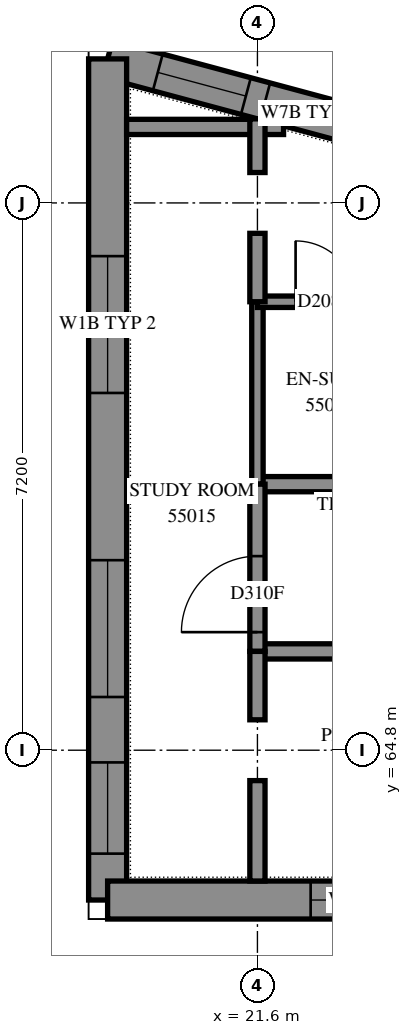
"""IFC4 building model, lengths in metres.
Left out: names, types, materials, properties, quantities, classifications, styles, units other than length and angle.
Written with IfcOpenShell. Run it as: python <this file> out.ifc"""

import sys

from ifc_helpers import new_model, si_unit, direction, frame, frame_2d, origin, place, context, subcontext, project, spatial, polyline, rectangle, outline, extrude, element, fill, save


model = new_model("IFC4")
c1 = context("Model", 3, precision=1e-05, world=origin(), true_north=direction((0.0, 1.0)))
c2 = subcontext(c1, "Body", "Model", "MODEL_VIEW")
j1 = project(units=[si_unit("LENGTHUNIT", "METRE"), si_unit("PLANEANGLEUNIT", "RADIAN")], contexts=[c1])
p1 = place(None, origin())
s1 = spatial("IfcSite", under=j1, at=p1, CompositionType="ELEMENT")
p2 = place(p1, origin())
s2 = spatial("IfcBuilding", under=s1, at=p2, CompositionType="ELEMENT")
p3 = place(p2, frame((0.0, 0.0, 203.2)))
s3 = spatial("IfcBuildingStorey", under=s2, at=p3, CompositionType="ELEMENT", Elevation=203.2)
p4 = place(p3, frame((23.156, 72.946, 0.0), z_axis=(0.0, 0.0, 1.0), x_axis=(-0.9656828727, 0.2597240638, 0.0)))
e1 = element("IfcWall", 1, at=p4, inside=s3, PredefinedType="SOLIDWALL", context=c2, shape_type="SweptSolid", body=[
    extrude(outline(polyline([(0.047, -0.25), (3.978, -0.25), (3.326, 0.25), (-0.047, 0.25), (0.047, -0.25)])), origin(), (0.0, 0.0, 1.0), 3.1),
])
p5 = place(p4, frame((0.306, 0.0, 0.7)))
e2 = element("IfcOpeningElement", 2, at=p5, cuts=e1, PredefinedType="OPENING", context=c2, shape_type="SweptSolid", body=[
    extrude(rectangle(XDim=1.2, YDim=2.1, at=frame_2d((0.6, 1.05))), frame((0.0, 0.26, 0.0), z_axis=(0.0, -1.0, 0.0), x_axis=(1.0, 0.0, 0.0)), (0.0, 0.0, 1.0), 0.52),
])
p6 = place(p4, frame((1.769, 0.0, 0.7)))
e3 = element("IfcOpeningElement", 3, at=p6, cuts=e1, PredefinedType="OPENING", context=c2, shape_type="SweptSolid", body=[
    extrude(rectangle(XDim=1.2, YDim=2.1, at=frame_2d((0.6, 1.05))), frame((0.0, 0.26, 0.0), z_axis=(0.0, -1.0, 0.0), x_axis=(1.0, 0.0, 0.0)), (0.0, 0.0, 1.0), 0.52),
])
p7 = place(p3, frame((19.629, 73.895, 0.0), z_axis=(0.0, 0.0, 1.0), x_axis=(0.0, -1.0, 0.0)))
e4 = element("IfcWall", 4, at=p7, inside=s3, PredefinedType="SOLIDWALL", context=c2, shape_type="SweptSolid", body=[
    extrude(outline(polyline([(-0.326, -0.25), (11.316, -0.25), (10.816, 0.25), (0.326, 0.25), (-0.326, -0.25)])), origin(), (0.0, 0.0, 1.0), 3.1),
])
p8 = place(p7, frame((2.595, 0.0, 0.7)))
e5 = element("IfcOpeningElement", 5, at=p8, cuts=e4, PredefinedType="OPENING", context=c2, shape_type="SweptSolid", body=[
    extrude(rectangle(XDim=1.8, YDim=2.1, at=frame_2d((0.9, 1.05))), frame((0.0, 0.26, 0.0), z_axis=(0.0, -1.0, 0.0), x_axis=(1.0, 0.0, 0.0)), (0.0, 0.0, 1.0), 0.52),
])
p9 = place(p7, frame((6.595, 0.0, 0.7)))
e6 = element("IfcOpeningElement", 6, at=p9, cuts=e4, PredefinedType="OPENING", context=c2, shape_type="SweptSolid", body=[
    extrude(rectangle(XDim=1.8, YDim=2.1, at=frame_2d((0.9, 1.05))), frame((0.0, 0.26, 0.0), z_axis=(0.0, -1.0, 0.0), x_axis=(1.0, 0.0, 0.0)), (0.0, 0.0, 1.0), 0.52),
])
p10 = place(p7, frame((9.255, 0.0, 0.7)))
e7 = element("IfcOpeningElement", 7, at=p10, cuts=e4, PredefinedType="OPENING", context=c2, shape_type="SweptSolid", body=[
    extrude(rectangle(XDim=1.2, YDim=2.1, at=frame_2d((0.6, 1.05))), frame((0.0, 0.26, 0.0), z_axis=(0.0, -1.0, 0.0), x_axis=(1.0, 0.0, 0.0)), (0.0, 0.0, 1.0), 0.52),
])
p11 = place(p3, frame((19.629, 62.829, 0.0), z_axis=(0.0, 0.0, 1.0), x_axis=(1.0, 0.0, 0.0)))
e8 = element("IfcWall", 8, at=p11, inside=s3, PredefinedType="SOLIDWALL", context=c2, shape_type="SweptSolid", body=[
    extrude(outline(polyline([(-0.25, -0.25), (15.171, -0.25), (15.671, 0.25), (0.25, 0.25), (-0.25, -0.25)])), origin(), (0.0, 0.0, 1.0), 3.1),
])
p12 = place(p11, frame((2.671, 0.0, 0.7)))
e9 = element("IfcOpeningElement", 9, at=p12, cuts=e8, PredefinedType="OPENING", context=c2, shape_type="SweptSolid", body=[
    extrude(rectangle(XDim=1.8, YDim=1.8, at=frame_2d((0.9, 0.9))), frame((0.0, 0.26, 0.0), z_axis=(0.0, -1.0, 0.0), x_axis=(1.0, 0.0, 0.0)), (0.0, 0.0, 1.0), 0.52),
])
p13 = place(p11, frame((6.471, 0.0, 0.7)))
e10 = element("IfcOpeningElement", 10, at=p13, cuts=e8, PredefinedType="OPENING", context=c2, shape_type="SweptSolid", body=[
    extrude(rectangle(XDim=1.8, YDim=1.8, at=frame_2d((0.9, 0.9))), frame((0.0, 0.26, 0.0), z_axis=(0.0, -1.0, 0.0), x_axis=(1.0, 0.0, 0.0)), (0.0, 0.0, 1.0), 0.52),
])
p14 = place(p11, frame((10.071, 0.0, 0.7)))
e11 = element("IfcOpeningElement", 11, at=p14, cuts=e8, PredefinedType="OPENING", context=c2, shape_type="SweptSolid", body=[
    extrude(rectangle(XDim=1.8, YDim=1.8, at=frame_2d((0.9, 0.9))), frame((0.0, 0.26, 0.0), z_axis=(0.0, -1.0, 0.0), x_axis=(1.0, 0.0, 0.0)), (0.0, 0.0, 1.0), 0.52),
])
p15 = place(p11, frame((13.096, 0.0, 0.7)))
e12 = element("IfcOpeningElement", 12, at=p15, cuts=e8, PredefinedType="OPENING", context=c2, shape_type="SweptSolid", body=[
    extrude(rectangle(XDim=1.8, YDim=1.8, at=frame_2d((0.9, 0.9))), frame((0.0, 0.26, 0.0), z_axis=(0.0, -1.0, 0.0), x_axis=(1.0, 0.0, 0.0)), (0.0, 0.0, 1.0), 0.52),
])
p16 = place(p3, frame((21.6, 68.3, 0.0), z_axis=(0.0, 0.0, 1.0), x_axis=(1.0, 0.0, 0.0)))
e13 = element("IfcWall", 13, at=p16, inside=s3, PredefinedType="PARTITIONING", context=c2, shape_type="SweptSolid", body=[
    extrude(rectangle(XDim=19.1, YDim=0.2, at=frame_2d((9.55, 0.0))), origin(), (0.0, 0.0, 1.0), 3.1),
])
p17 = place(p16, frame((2.3, 0.0, 0.0)))
e14 = element("IfcOpeningElement", 14, at=p17, cuts=e13, PredefinedType="OPENING", context=c2, shape_type="SweptSolid", body=[
    extrude(rectangle(XDim=0.9, YDim=2.1, at=frame_2d((0.45, 1.05))), frame((0.0, 0.11, 0.0), z_axis=(0.0, -1.0, 0.0), x_axis=(1.0, 0.0, 0.0)), (0.0, 0.0, 1.0), 0.22),
])
p18 = place(p16, frame((5.901, 0.0, 0.0)))
e15 = element("IfcOpeningElement", 15, at=p18, cuts=e13, PredefinedType="OPENING", context=c2, shape_type="SweptSolid", body=[
    extrude(rectangle(XDim=0.9, YDim=2.1, at=frame_2d((0.45, 1.05))), frame((0.0, 0.11, 0.0), z_axis=(0.0, -1.0, 0.0), x_axis=(1.0, 0.0, 0.0)), (0.0, 0.0, 1.0), 0.22),
])
p19 = place(p16, frame((13.139, 0.0, 0.0)))
e16 = element("IfcOpeningElement", 16, at=p19, cuts=e13, PredefinedType="OPENING", context=c2, shape_type="SweptSolid", body=[
    extrude(rectangle(XDim=0.9, YDim=2.1, at=frame_2d((0.45, 1.05))), frame((0.0, 0.11, 0.0), z_axis=(0.0, -1.0, 0.0), x_axis=(1.0, 0.0, 0.0)), (0.0, 0.0, 1.0), 0.22),
])
p20 = place(p3, frame((21.6, 66.1, 0.0), z_axis=(0.0, 0.0, 1.0), x_axis=(1.0, 0.0, 0.0)))
e17 = element("IfcWall", 17, at=p20, inside=s3, PredefinedType="PARTITIONING", context=c2, shape_type="SweptSolid", body=[
    extrude(rectangle(XDim=16.9, YDim=0.2, at=frame_2d((8.45, 0.0))), origin(), (0.0, 0.0, 1.0), 3.1),
])
p21 = place(p20, frame((12.493, 0.0, 0.0)))
e18 = element("IfcOpeningElement", 18, at=p21, cuts=e17, PredefinedType="OPENING", context=c2, shape_type="SweptSolid", body=[
    extrude(rectangle(XDim=1.0, YDim=2.1, at=frame_2d((0.5, 1.05))), frame((0.0, 0.11, 0.0), z_axis=(0.0, -1.0, 0.0), x_axis=(1.0, 0.0, 0.0)), (0.0, 0.0, 1.0), 0.22),
])
p22 = place(p3, frame((21.6, 68.3, 0.0), z_axis=(0.0, 0.0, 1.0), x_axis=(0.0, 1.0, 0.0)))
e19 = element("IfcWall", 19, at=p22, inside=s3, PredefinedType="PARTITIONING", context=c2, shape_type="SweptSolid", body=[
    extrude(rectangle(XDim=2.4, YDim=0.15, at=frame_2d((1.2, 0.0))), origin(), (0.0, 0.0, 1.0), 3.1),
])
p23 = place(p3, frame((21.6, 66.1, 0.0), z_axis=(0.0, 0.0, 1.0), x_axis=(0.0, 1.0, 0.0)))
e20 = element("IfcWall", 20, at=p23, inside=s3, PredefinedType="PARTITIONING", context=c2, shape_type="SweptSolid", body=[
    extrude(rectangle(XDim=2.2, YDim=0.2, at=frame_2d((1.1, 0.0))), origin(), (0.0, 0.0, 1.0), 3.1),
])
p24 = place(p23, frame((0.253, 0.0, 0.0)))
e21 = element("IfcOpeningElement", 21, at=p24, cuts=e20, PredefinedType="OPENING", context=c2, shape_type="SweptSolid", body=[
    extrude(rectangle(XDim=1.0, YDim=2.1, at=frame_2d((0.5, 1.05))), frame((0.0, 0.11, 0.0), z_axis=(0.0, -1.0, 0.0), x_axis=(1.0, 0.0, 0.0)), (0.0, 0.0, 1.0), 0.22),
])
p25 = place(p3, frame((19.879, 73.0, 0.0), z_axis=(0.0, 0.0, 1.0), x_axis=(1.0, 0.0, 0.0)))
e22 = element("IfcWall", 22, at=p25, inside=s3, PredefinedType="PARTITIONING", context=c2, shape_type="SweptSolid", body=[
    extrude(rectangle(XDim=2.065, YDim=0.2, at=frame_2d((1.032, 0.0))), origin(), (0.0, 0.0, 1.0), 3.1),
])
p26 = place(p3, frame((21.6, 70.7, 0.0), z_axis=(0.0, 0.0, 1.0), x_axis=(1.0, 0.0, 0.0)))
e23 = element("IfcWall", 23, at=p26, inside=s3, PredefinedType="PARTITIONING", context=c2, shape_type="SweptSolid", body=[
    extrude(rectangle(XDim=1.9, YDim=0.15, at=frame_2d((0.95, 0.0))), origin(), (0.0, 0.0, 1.0), 3.1),
])
p27 = place(p26, frame((0.502, 0.0, 0.0)))
e24 = element("IfcOpeningElement", 24, at=p27, cuts=e23, PredefinedType="OPENING", context=c2, shape_type="SweptSolid", body=[
    extrude(rectangle(XDim=0.8, YDim=2.1, at=frame_2d((0.4, 1.05))), frame((0.0, 0.085, 0.0), z_axis=(0.0, -1.0, 0.0), x_axis=(1.0, 0.0, 0.0)), (0.0, 0.0, 1.0), 0.17),
])
p28 = place(p3, frame((21.6, 63.079, 0.0), z_axis=(0.0, 0.0, 1.0), x_axis=(0.0, 1.0, 0.0)))
e25 = element("IfcWall", 25, at=p28, inside=s3, PredefinedType="PARTITIONING", context=c2, shape_type="SweptSolid", body=[
    extrude(rectangle(XDim=1.321, YDim=0.2, at=frame_2d((0.66, 0.0))), origin(), (0.0, 0.0, 1.0), 3.1),
])
for number, where, z_axis, x_axis in (
    (26, (21.6, 65.2, 0.0), (0.0, 0.0, 1.0), (0.0, 1.0, 0.0)),
    (27, (21.6, 70.7, 0.0), (0.0, 0.0, 1.0), (0.0, 1.0, 0.0)),
):
    element("IfcWall", number, at=place(p3, frame(where, z_axis=z_axis, x_axis=x_axis)), inside=s3, PredefinedType="PARTITIONING", context=c2, shape_type="SweptSolid", body=[
        extrude(rectangle(XDim=0.9, YDim=0.2, at=frame_2d((0.45, 0.0))), origin(), (0.0, 0.0, 1.0), 3.1),
    ])
p29 = place(p3, frame((21.6, 72.4, 0.0), z_axis=(0.0, 0.0, 1.0), x_axis=(0.0, 1.0, 0.0)))
e28 = element("IfcWall", 28, at=p29, inside=s3, PredefinedType="PARTITIONING", context=c2, shape_type="SweptSolid", body=[
    extrude(rectangle(XDim=0.706, YDim=0.2, at=frame_2d((0.353, 0.0))), origin(), (0.0, 0.0, 1.0), 3.1),
])
p30 = place(p5, origin())
e29 = element("IfcWindow", 29, at=p30, inside=s3, PartitioningType="SINGLE_PANEL", PredefinedType="WINDOW", context=c2, shape_type="SweptSolid", body=[
    extrude(rectangle(XDim=1.2, YDim=2.1, at=frame_2d((0.6, 1.05))), frame((0.0, 0.13, 0.0), z_axis=(0.0, -1.0, 0.0), x_axis=(1.0, 0.0, 0.0)), (0.0, 0.0, 1.0), 0.06),
])
fill(e2, e29)
p31 = place(p6, origin())
e30 = element("IfcWindow", 30, at=p31, inside=s3, PartitioningType="SINGLE_PANEL", PredefinedType="WINDOW", context=c2, shape_type="SweptSolid", body=[
    extrude(rectangle(XDim=1.2, YDim=2.1, at=frame_2d((0.6, 1.05))), frame((0.0, 0.18, 0.0), z_axis=(0.0, -1.0, 0.0), x_axis=(1.0, 0.0, 0.0)), (0.0, 0.0, 1.0), 0.06),
])
fill(e3, e30)
p32 = place(p8, origin())
e31 = element("IfcWindow", 31, at=p32, inside=s3, PartitioningType="SINGLE_PANEL", PredefinedType="WINDOW", context=c2, shape_type="SweptSolid", body=[
    extrude(rectangle(XDim=1.8, YDim=2.1, at=frame_2d((0.9, 1.05))), frame((0.0, 0.18, 0.0), z_axis=(0.0, -1.0, 0.0), x_axis=(1.0, 0.0, 0.0)), (0.0, 0.0, 1.0), 0.06),
])
fill(e5, e31)
p33 = place(p9, origin())
e32 = element("IfcWindow", 32, at=p33, inside=s3, PartitioningType="SINGLE_PANEL", PredefinedType="WINDOW", context=c2, shape_type="SweptSolid", body=[
    extrude(rectangle(XDim=1.8, YDim=2.1, at=frame_2d((0.9, 1.05))), frame((0.0, 0.18, 0.0), z_axis=(0.0, -1.0, 0.0), x_axis=(1.0, 0.0, 0.0)), (0.0, 0.0, 1.0), 0.06),
])
fill(e6, e32)
p34 = place(p10, origin())
e33 = element("IfcWindow", 33, at=p34, inside=s3, PartitioningType="SINGLE_PANEL", PredefinedType="WINDOW", context=c2, shape_type="SweptSolid", body=[
    extrude(rectangle(XDim=1.2, YDim=2.1, at=frame_2d((0.6, 1.05))), frame((0.0, 0.18, 0.0), z_axis=(0.0, -1.0, 0.0), x_axis=(1.0, 0.0, 0.0)), (0.0, 0.0, 1.0), 0.06),
])
fill(e7, e33)
p35 = place(p12, origin())
e34 = element("IfcWindow", 34, at=p35, inside=s3, PartitioningType="SINGLE_PANEL", PredefinedType="WINDOW", context=c2, shape_type="SweptSolid", body=[
    extrude(rectangle(XDim=1.8, YDim=1.8, at=frame_2d((0.9, 0.9))), frame((0.0, 0.18, 0.0), z_axis=(0.0, -1.0, 0.0), x_axis=(1.0, 0.0, 0.0)), (0.0, 0.0, 1.0), 0.06),
])
fill(e9, e34)
p36 = place(p24, origin())
e35 = element("IfcDoor", 35, at=p36, inside=s3, OperationType="SINGLE_SWING_RIGHT", PredefinedType="DOOR", context=c2, shape_type="SweptSolid", body=[
    extrude(rectangle(XDim=1.0, YDim=2.1, at=frame_2d((0.5, 1.05))), frame((0.0, 0.025, 0.0), z_axis=(0.0, -1.0, 0.0), x_axis=(1.0, 0.0, 0.0)), (0.0, 0.0, 1.0), 0.05),
])
fill(e21, e35)
p37 = place(p27, origin())
e36 = element("IfcDoor", 36, at=p37, inside=s3, OperationType="SINGLE_SWING_RIGHT", PredefinedType="DOOR", context=c2, shape_type="SweptSolid", body=[
    extrude(rectangle(XDim=0.8, YDim=2.1, at=frame_2d((0.4, 1.05))), frame((0.0, 0.025, 0.0), z_axis=(0.0, -1.0, 0.0), x_axis=(1.0, 0.0, 0.0)), (0.0, 0.0, 1.0), 0.05),
])
fill(e24, e36)
save(model, sys.argv[1])
